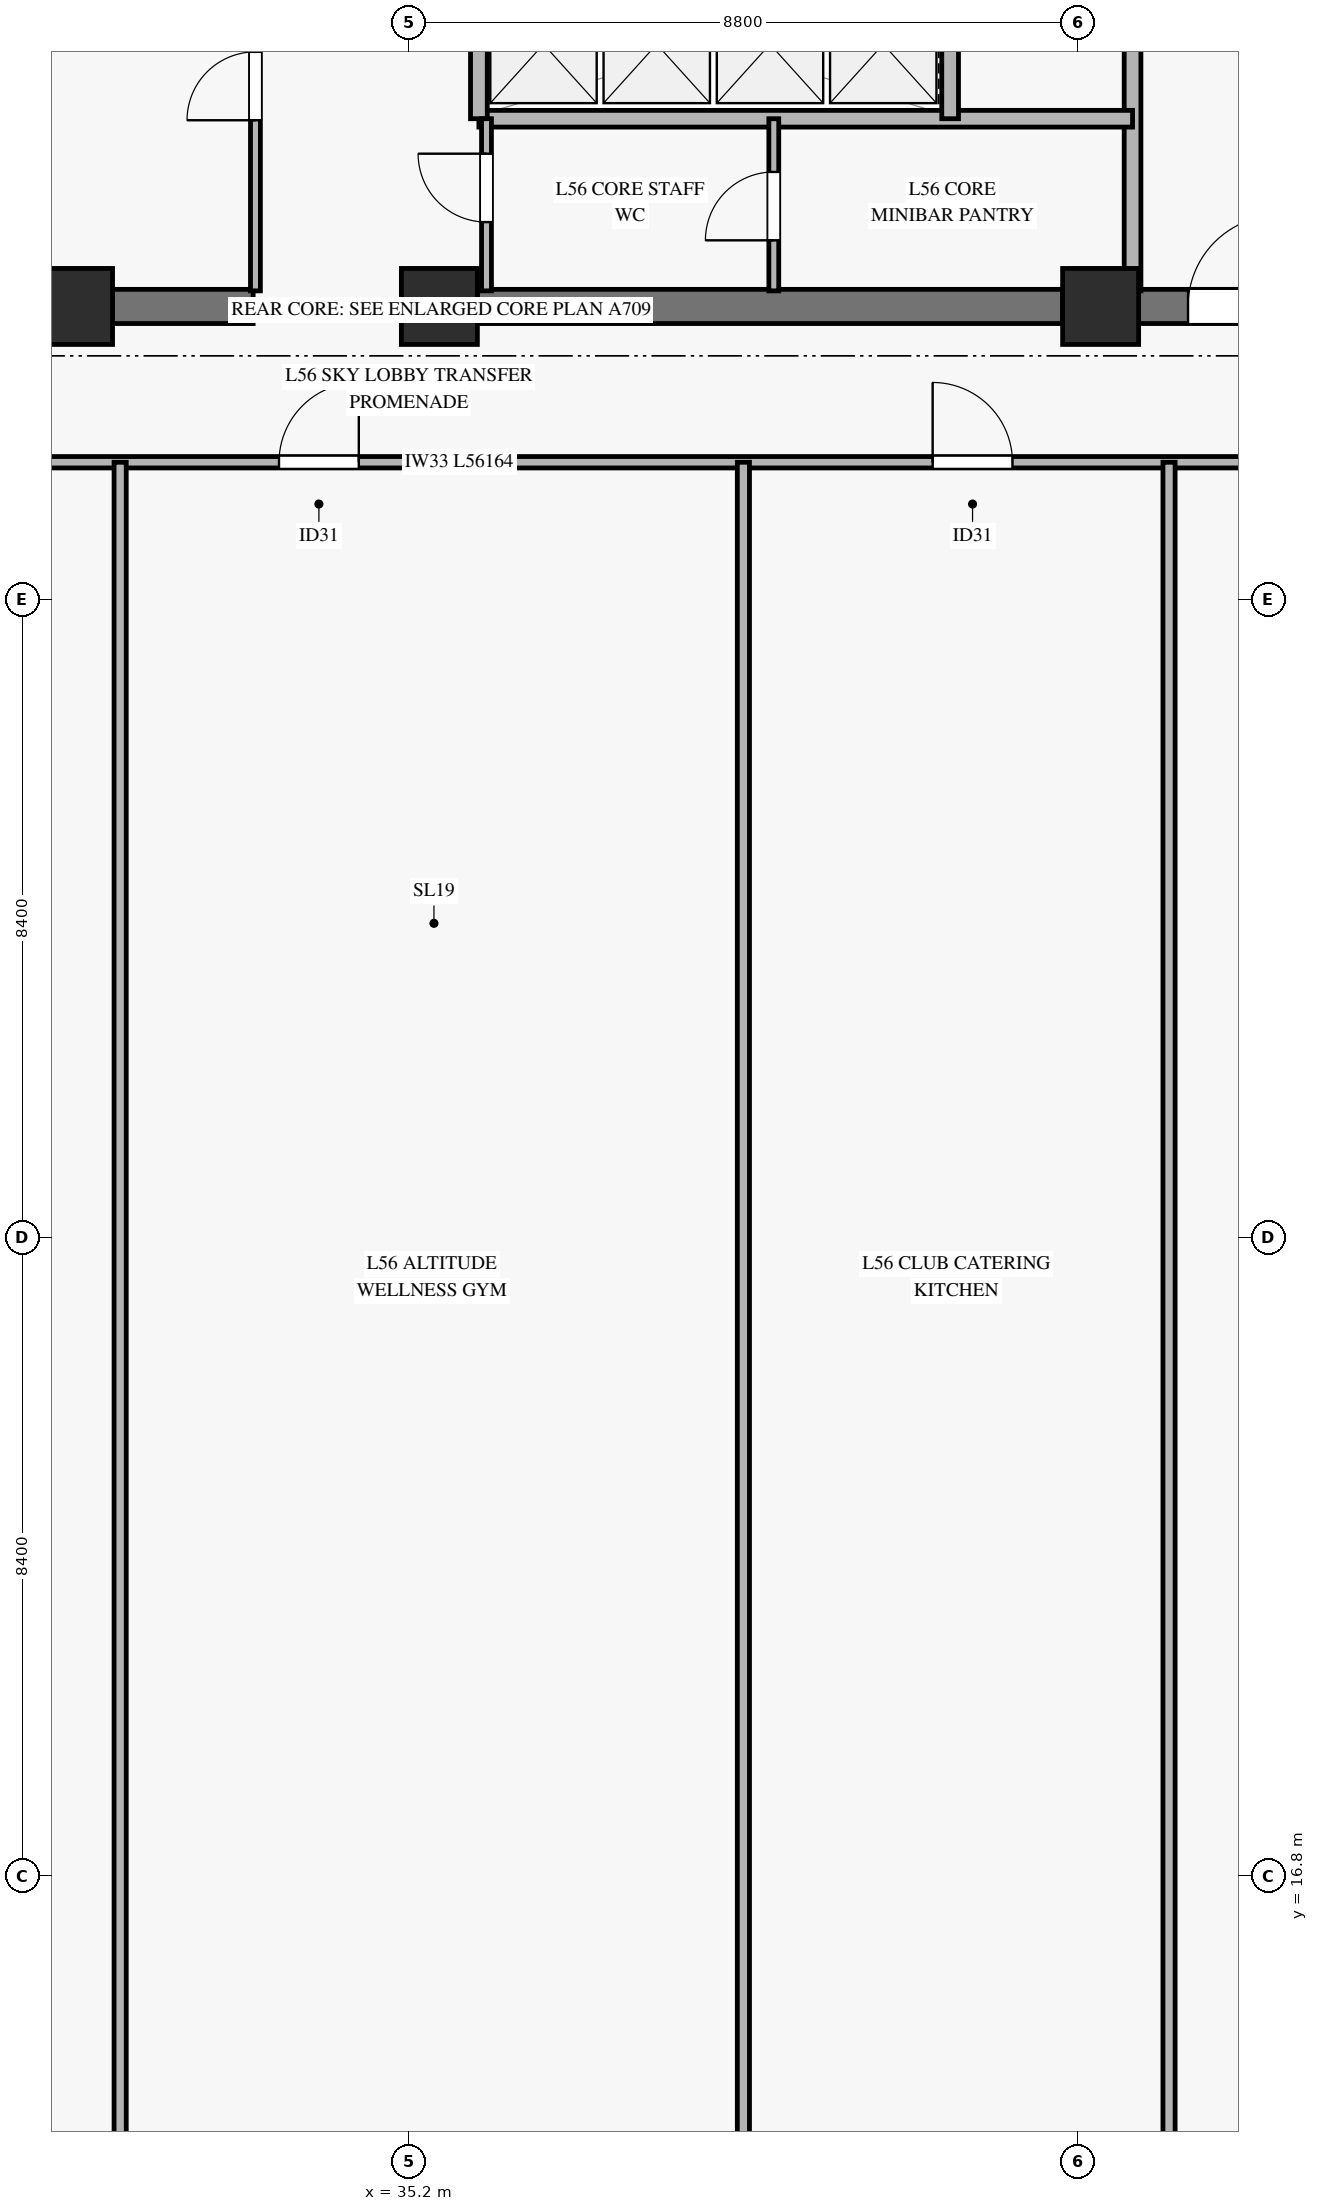
"""IFC4 building model, lengths in metres.
Left out: names, types, materials, properties, quantities, classifications, styles, units other than length and angle.
Written with IfcOpenShell. Run it as: python <this file> out.ifc"""

import sys

from ifc_helpers import new_model, si_unit, direction, frame, frame_2d, origin, origin_2d, place, context, subcontext, project, spatial, rectangle, hollow_rectangle, extrude, source, transform, mapped, element, fill, save


model = new_model("IFC4")
c1 = context("Model", 3, precision=1e-05, world=origin(), true_north=direction((0.0, 1.0)))
c2 = subcontext(c1, "Body", "Model", "MODEL_VIEW")
j1 = project(units=[si_unit("LENGTHUNIT", "METRE"), si_unit("PLANEANGLEUNIT", "RADIAN")], contexts=[c1])
p1 = place(None, origin())
s1 = spatial("IfcSite", under=j1, at=p1, CompositionType="ELEMENT")
p2 = place(p1, origin())
s2 = spatial("IfcBuilding", under=s1, at=p2, CompositionType="ELEMENT")
p3 = place(p2, frame((0.0, 0.0, 220.2)))
s3 = spatial("IfcBuildingStorey", under=s2, at=p3, CompositionType="ELEMENT", Elevation=220.2)
m1 = source(origin(), c2, "Body", "SweptSolid", [
    extrude(rectangle(XDim=1.0, YDim=1.0, at=origin_2d()), origin(), (0.0, 0.0, 1.0), 6.585),
])
for number, where, z_axis, x_axis in (
    (1, (30.8, 37.45, 0.0), (0.0, 0.0, 1.0), (1.0, 0.0, 0.0)),
    (2, (35.6, 37.45, 0.0), (0.0, 0.0, 1.0), (1.0, 0.0, 0.0)),
    (3, (44.3, 37.45, 0.0), (0.0, 0.0, 1.0), (1.0, 0.0, 0.0)),
):
    element("IfcColumn", number, at=place(p3, frame(where, z_axis=z_axis, x_axis=x_axis)), inside=s3, PredefinedType="PILASTER", context=c2, shape_type="MappedRepresentation", body=[
        mapped(m1, transform((0.0, 0.0, 0.0), x_axis=(1.0, 0.0, 0.0), y_axis=(0.0, 1.0, 0.0), z_axis=(0.0, 0.0, 1.0), scale=1.0)),
    ])
p4 = place(p3, frame((31.3, 37.45, 0.0), z_axis=(0.0, 0.0, 1.0), x_axis=(1.0, 0.0, 0.0)))
e4 = element("IfcWall", 4, at=p4, inside=s3, PredefinedType="SHEAR", context=c2, shape_type="SweptSolid", body=[
    extrude(rectangle(XDim=1.85, YDim=0.45, at=frame_2d((0.925, 0.0))), origin(), (0.0, 0.0, 1.0), 6.585),
])
p5 = place(p3, frame((36.1, 37.45, 0.0), z_axis=(0.0, 0.0, 1.0), x_axis=(1.0, 0.0, 0.0)))
e5 = element("IfcWall", 5, at=p5, inside=s3, PredefinedType="SHEAR", context=c2, shape_type="SweptSolid", body=[
    extrude(rectangle(XDim=7.7, YDim=0.45, at=frame_2d((3.85, 0.0))), origin(), (0.0, 0.0, 1.0), 6.585),
])
p6 = place(p3, frame((44.8, 37.45, 0.0), z_axis=(0.0, 0.0, 1.0), x_axis=(1.0, 0.0, 0.0)))
e6 = element("IfcWall", 6, at=p6, inside=s3, PredefinedType="SHEAR", context=c2, shape_type="SweptSolid", body=[
    extrude(rectangle(XDim=5.25, YDim=0.45, at=frame_2d((2.625, 0.0))), origin(), (0.0, 0.0, 1.0), 6.585),
])
p7 = place(p6, frame((0.65, 0.0, 0.0)))
e7 = element("IfcOpeningElement", 7, at=p7, cuts=e6, PredefinedType="OPENING", context=c2, shape_type="SweptSolid", body=[
    extrude(rectangle(XDim=1.2, YDim=2.15, at=frame_2d((0.6, 1.075))), frame((0.0, 0.235, 0.0), z_axis=(0.0, -1.0, 0.0), x_axis=(1.0, 0.0, 0.0)), (0.0, 0.0, 1.0), 0.47),
])
m2 = source(origin(), c2, "Body", "SweptSolid", [
    extrude(hollow_rectangle(XDim=0.6, YDim=0.6, WallThickness=0.028, at=origin_2d()), origin(), (0.0, 0.0, 1.0), 6.651),
])
for number, where, z_axis, x_axis in (
    (8, (30.8, 12.318, 0.0), (0.0, 0.14, 0.99), (-1.0, 0.0, 0.0)),
    (9, (37.55, 12.318, 0.0), (0.0, 0.14, 0.99), (-1.0, 0.0, 0.0)),
    (10, (44.3, 12.318, 0.0), (0.0, 0.14, 0.99), (-1.0, 0.0, 0.0)),
):
    element("IfcColumn", number, at=place(p3, frame(where, z_axis=z_axis, x_axis=x_axis)), inside=s3, PredefinedType="COLUMN", context=c2, shape_type="MappedRepresentation", body=[
        mapped(m2, transform((0.0, 0.0, 0.0), x_axis=(1.0, 0.0, 0.0), y_axis=(0.0, 1.0, 0.0), z_axis=(0.0, 0.0, 1.0), scale=1.0)),
    ])
p8 = place(p3, frame((44.72, 37.655, 0.0), z_axis=(0.0, 0.0, 1.0), x_axis=(0.0, 1.0, 0.0)))
e11 = element("IfcWall", 11, at=p8, inside=s3, PredefinedType="SOLIDWALL", context=c2, shape_type="SweptSolid", body=[
    extrude(rectangle(XDim=7.565, YDim=0.22, at=frame_2d((3.782, 0.0))), origin(), (0.0, 0.0, 1.0), 6.585),
])
p9 = place(p3, frame((36.12, 39.92, 0.0), z_axis=(0.0, 0.0, 1.0), x_axis=(1.0, 0.0, 0.0)))
e12 = element("IfcWall", 12, at=p9, inside=s3, PredefinedType="SOLIDWALL", context=c2, shape_type="SweptSolid", body=[
    extrude(rectangle(XDim=8.6, YDim=0.22, at=frame_2d((4.3, 0.0))), origin(), (0.0, 0.0, 1.0), 5.87),
])
p10 = place(p3, frame((42.32, 39.92, 0.0), z_axis=(0.0, 0.0, 1.0), x_axis=(0.0, 1.0, 0.0)))
e13 = element("IfcWall", 13, at=p10, inside=s3, PredefinedType="SOLIDWALL", context=c2, shape_type="SweptSolid", body=[
    extrude(rectangle(XDim=6.425, YDim=0.22, at=frame_2d((3.212, 0.0))), origin(), (0.0, 0.0, 1.0), 6.585),
])
p11 = place(p3, frame((36.12, 39.92, 0.0), z_axis=(0.0, 0.0, 1.0), x_axis=(0.0, 1.0, 0.0)))
e14 = element("IfcWall", 14, at=p11, inside=s3, PredefinedType="SOLIDWALL", context=c2, shape_type="SweptSolid", body=[
    extrude(rectangle(XDim=1.96, YDim=0.22, at=frame_2d((0.98, 0.0))), origin(), (0.0, 0.0, 1.0), 6.585),
])
p12 = place(p3, frame((33.18, 37.655, 0.0), z_axis=(0.0, 0.0, 1.0), x_axis=(0.0, 1.0, 0.0)))
e15 = element("IfcWall", 15, at=p12, inside=s3, PredefinedType="PARTITIONING", context=c2, shape_type="SweptSolid", body=[
    extrude(rectangle(XDim=6.495, YDim=0.13, at=frame_2d((3.248, 0.0))), origin(), (0.0, 0.0, 1.0), 5.67),
])
p13 = place(p12, frame((2.245, 0.0, 0.0)))
e16 = element("IfcOpeningElement", 16, at=p13, cuts=e15, PredefinedType="OPENING", context=c2, shape_type="SweptSolid", body=[
    extrude(rectangle(XDim=0.9, YDim=2.1, at=frame_2d((0.45, 1.05))), frame((0.0, 0.075, 0.0), z_axis=(0.0, -1.0, 0.0), x_axis=(1.0, 0.0, 0.0)), (0.0, 0.0, 1.0), 0.15),
])
p14 = place(p3, frame((36.22, 37.655, 0.0), z_axis=(0.0, 0.0, 1.0), x_axis=(0.0, 1.0, 0.0)))
e17 = element("IfcWall", 17, at=p14, inside=s3, PredefinedType="PARTITIONING", context=c2, shape_type="SweptSolid", body=[
    extrude(rectangle(XDim=2.265, YDim=0.13, at=frame_2d((1.132, 0.0))), origin(), (0.0, 0.0, 1.0), 6.585),
])
p15 = place(p14, frame((0.905, 0.0, 0.0)))
e18 = element("IfcOpeningElement", 18, at=p15, cuts=e17, PredefinedType="OPENING", context=c2, shape_type="SweptSolid", body=[
    extrude(rectangle(XDim=0.9, YDim=2.1, at=frame_2d((0.45, 1.05))), frame((0.0, 0.075, 0.0), z_axis=(0.0, -1.0, 0.0), x_axis=(1.0, 0.0, 0.0)), (0.0, 0.0, 1.0), 0.15),
])
p16 = place(p3, frame((40.0, 37.655, 0.0), z_axis=(0.0, 0.0, 1.0), x_axis=(0.0, 1.0, 0.0)))
e19 = element("IfcWall", 19, at=p16, inside=s3, PredefinedType="PARTITIONING", context=c2, shape_type="SweptSolid", body=[
    extrude(rectangle(XDim=2.265, YDim=0.13, at=frame_2d((1.132, 0.0))), origin(), (0.0, 0.0, 1.0), 6.585),
])
p17 = place(p16, frame((0.665, 0.0, 0.0)))
e20 = element("IfcOpeningElement", 20, at=p17, cuts=e19, PredefinedType="OPENING", context=c2, shape_type="SweptSolid", body=[
    extrude(rectangle(XDim=0.9, YDim=2.1, at=frame_2d((0.45, 1.05))), frame((0.0, 0.075, 0.0), z_axis=(0.0, -1.0, 0.0), x_axis=(1.0, 0.0, 0.0)), (0.0, 0.0, 1.0), 0.15),
])
p18 = place(p3, frame((7.118, 35.4, 0.0), z_axis=(0.0, 0.0, 1.0), x_axis=(1.0, 0.0, 0.0)))
e21 = element("IfcWall", 21, at=p18, inside=s3, PredefinedType="PARTITIONING", context=c2, shape_type="SweptSolid", body=[
    extrude(rectangle(XDim=56.164, YDim=0.15, at=frame_2d((28.082, 0.0))), origin(), (0.0, 0.0, 1.0), 5.77),
])
p19 = place(p18, frame((6.492, 0.0, 0.0)))
e22 = element("IfcOpeningElement", 22, at=p19, cuts=e21, PredefinedType="OPENING", context=c2, shape_type="SweptSolid", body=[
    extrude(rectangle(XDim=1.05, YDim=2.15, at=frame_2d((0.525, 1.075))), frame((0.0, 0.085, 0.0), z_axis=(0.0, -1.0, 0.0), x_axis=(1.0, 0.0, 0.0)), (0.0, 0.0, 1.0), 0.17),
])
p20 = place(p18, frame((18.772, 0.0, 0.0)))
e23 = element("IfcOpeningElement", 23, at=p20, cuts=e21, PredefinedType="OPENING", context=c2, shape_type="SweptSolid", body=[
    extrude(rectangle(XDim=1.05, YDim=2.15, at=frame_2d((0.525, 1.075))), frame((0.0, 0.085, 0.0), z_axis=(0.0, -1.0, 0.0), x_axis=(1.0, 0.0, 0.0)), (0.0, 0.0, 1.0), 0.17),
])
p21 = place(p18, frame((26.372, 0.0, 0.0)))
e24 = element("IfcOpeningElement", 24, at=p21, cuts=e21, PredefinedType="OPENING", context=c2, shape_type="SweptSolid", body=[
    extrude(rectangle(XDim=1.05, YDim=2.15, at=frame_2d((0.525, 1.075))), frame((0.0, 0.085, 0.0), z_axis=(0.0, -1.0, 0.0), x_axis=(1.0, 0.0, 0.0)), (0.0, 0.0, 1.0), 0.17),
])
p22 = place(p18, frame((34.972, 0.0, 0.0)))
e25 = element("IfcOpeningElement", 25, at=p22, cuts=e21, PredefinedType="OPENING", context=c2, shape_type="SweptSolid", body=[
    extrude(rectangle(XDim=1.05, YDim=2.15, at=frame_2d((0.525, 1.075))), frame((0.0, 0.085, 0.0), z_axis=(0.0, -1.0, 0.0), x_axis=(1.0, 0.0, 0.0)), (0.0, 0.0, 1.0), 0.17),
])
p23 = place(p18, frame((45.319, 0.0, 0.0)))
e26 = element("IfcOpeningElement", 26, at=p23, cuts=e21, PredefinedType="OPENING", context=c2, shape_type="SweptSolid", body=[
    extrude(rectangle(XDim=1.05, YDim=2.15, at=frame_2d((0.525, 1.075))), frame((0.0, 0.085, 0.0), z_axis=(0.0, -1.0, 0.0), x_axis=(1.0, 0.0, 0.0)), (0.0, 0.0, 1.0), 0.17),
])
for number, where, z_axis, x_axis in (
    (27, (31.4, 12.318, 0.0), (0.0, 0.0, 1.0), (0.0, 1.0, 0.0)),
    (28, (39.6, 12.318, 0.0), (0.0, 0.0, 1.0), (0.0, 1.0, 0.0)),
    (29, (45.2, 12.318, 0.0), (0.0, 0.0, 1.0), (0.0, 1.0, 0.0)),
):
    element("IfcWall", number, at=place(p3, frame(where, z_axis=z_axis, x_axis=x_axis)), inside=s3, PredefinedType="PARTITIONING", context=c2, shape_type="SweptSolid", body=[
        extrude(rectangle(XDim=23.082, YDim=0.16, at=frame_2d((11.541, 0.0))), origin(), (0.0, 0.0, 1.0), 6.07),
    ])
m3 = source(origin(), c2, "Body", "SweptSolid", [
    extrude(rectangle(XDim=1.2, YDim=2.15, at=frame_2d((0.6, 1.075))), frame((0.0, 0.025, 0.0), z_axis=(0.0, -1.0, 0.0), x_axis=(1.0, 0.0, 0.0)), (0.0, 0.0, 1.0), 0.05),
])
p24 = place(p7, origin())
e30 = element("IfcDoor", 30, at=p24, inside=s3, OperationType="SINGLE_SWING_RIGHT", PredefinedType="DOOR", context=c2, shape_type="MappedRepresentation", body=[
    mapped(m3, transform((0.0, 0.0, 0.0), x_axis=(1.0, 0.0, 0.0), y_axis=(0.0, 1.0, 0.0), z_axis=(0.0, 0.0, 1.0), scale=1.0)),
])
fill(e7, e30)
m4 = source(origin(), c2, "Body", "SweptSolid", [
    extrude(rectangle(XDim=0.9, YDim=2.1, at=frame_2d((0.45, 1.05))), frame((0.0, 0.025, 0.0), z_axis=(0.0, -1.0, 0.0), x_axis=(1.0, 0.0, 0.0)), (0.0, 0.0, 1.0), 0.05),
])
p25 = place(p13, origin())
e31 = element("IfcDoor", 31, at=p25, inside=s3, OperationType="SINGLE_SWING_LEFT", PredefinedType="DOOR", context=c2, shape_type="MappedRepresentation", body=[
    mapped(m4, transform((0.0, 0.0, 0.0), x_axis=(1.0, 0.0, 0.0), y_axis=(0.0, 1.0, 0.0), z_axis=(0.0, 0.0, 1.0), scale=1.0)),
])
fill(e16, e31)
p26 = place(p15, origin())
e32 = element("IfcDoor", 32, at=p26, inside=s3, OperationType="SINGLE_SWING_RIGHT", PredefinedType="DOOR", context=c2, shape_type="MappedRepresentation", body=[
    mapped(m4, transform((0.0, 0.0, 0.0), x_axis=(1.0, 0.0, 0.0), y_axis=(0.0, 1.0, 0.0), z_axis=(0.0, 0.0, 1.0), scale=1.0)),
])
fill(e18, e32)
p27 = place(p17, origin())
e33 = element("IfcDoor", 33, at=p27, inside=s3, OperationType="SINGLE_SWING_LEFT", PredefinedType="DOOR", context=c2, shape_type="MappedRepresentation", body=[
    mapped(m4, transform((0.0, 0.0, 0.0), x_axis=(1.0, 0.0, 0.0), y_axis=(0.0, 1.0, 0.0), z_axis=(0.0, 0.0, 1.0), scale=1.0)),
])
fill(e20, e33)
m5 = source(origin(), c2, "Body", "SweptSolid", [
    extrude(rectangle(XDim=1.05, YDim=2.15, at=frame_2d((0.525, 1.075))), frame((0.0, 0.025, 0.0), z_axis=(0.0, -1.0, 0.0), x_axis=(1.0, 0.0, 0.0)), (0.0, 0.0, 1.0), 0.05),
])
p28 = place(p21, origin())
e34 = element("IfcDoor", 34, at=p28, inside=s3, OperationType="SINGLE_SWING_RIGHT", PredefinedType="DOOR", context=c2, shape_type="MappedRepresentation", body=[
    mapped(m5, transform((0.0, 0.0, 0.0), x_axis=(1.0, 0.0, 0.0), y_axis=(0.0, 1.0, 0.0), z_axis=(0.0, 0.0, 1.0), scale=1.0)),
])
fill(e24, e34)
p29 = place(p22, origin())
e35 = element("IfcDoor", 35, at=p29, inside=s3, OperationType="SINGLE_SWING_LEFT", PredefinedType="DOOR", context=c2, shape_type="MappedRepresentation", body=[
    mapped(m5, transform((0.0, 0.0, 0.0), x_axis=(1.0, 0.0, 0.0), y_axis=(0.0, 1.0, 0.0), z_axis=(0.0, 0.0, 1.0), scale=1.0)),
])
fill(e25, e35)
save(model, sys.argv[1])
